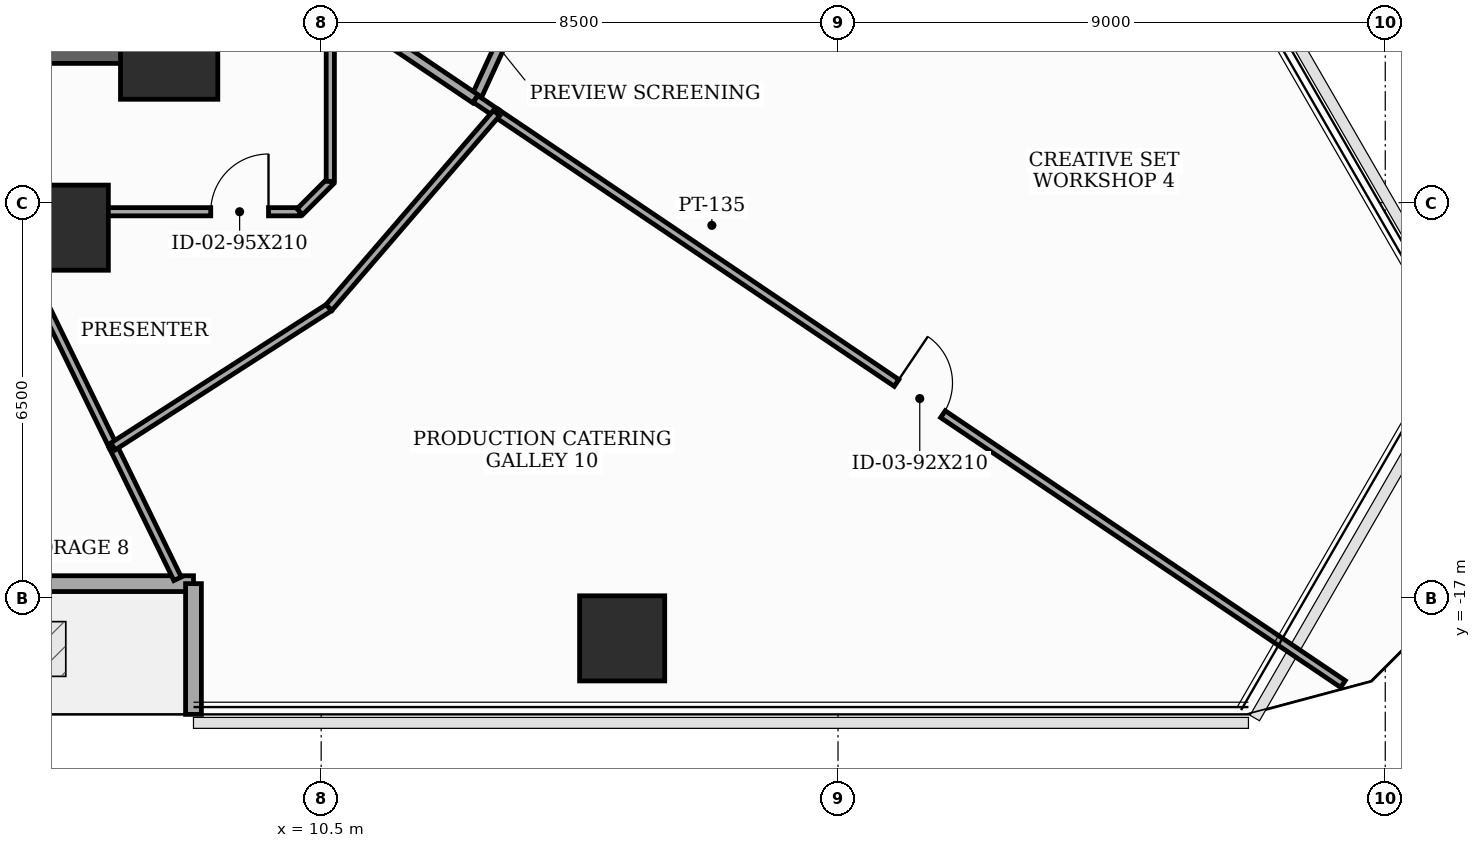
"""IFC4 building model, lengths in metres.
Left out: names, types, materials, properties, quantities, classifications, styles, units other than length and angle.
Written with IfcOpenShell. Run it as: python <this file> out.ifc"""

import sys

from ifc_helpers import new_model, si_unit, direction, frame, frame_2d, origin, origin_2d, place, context, subcontext, project, spatial, rectangle, extrude, element, fill, save


model = new_model("IFC4")
c1 = context("Model", 3, precision=1e-05, world=origin(), true_north=direction((0.0, 1.0)))
c2 = subcontext(c1, "Body", "Model", "MODEL_VIEW")
j1 = project(units=[si_unit("LENGTHUNIT", "METRE"), si_unit("PLANEANGLEUNIT", "RADIAN")], contexts=[c1])
p1 = place(None, origin())
s1 = spatial("IfcSite", under=j1, at=p1, CompositionType="ELEMENT")
p2 = place(p1, origin())
s2 = spatial("IfcBuilding", under=s1, at=p2, CompositionType="ELEMENT")
p3 = place(p2, frame((0.0, 0.0, 44.5)))
s3 = spatial("IfcBuildingStorey", under=s2, at=p3, CompositionType="ELEMENT", Elevation=44.5)
p4 = place(p3, frame((8.0, -8.0, 0.0), z_axis=(0.0, 0.0, 1.0), x_axis=(1.0, 0.0, 0.0)))
e1 = element("IfcColumn", 1, at=p4, inside=s3, PredefinedType="COLUMN", context=c2, shape_type="SweptSolid", body=[
    extrude(rectangle(XDim=1.6, YDim=1.6, at=origin_2d()), origin(), (0.0, 0.0, 1.0), 3.7),
])
for number, where, z_axis, x_axis in (
    (2, (6.3, -10.912, 0.0), (0.0, 0.0, 1.0), (1.0, 0.0, 0.0)),
    (3, (15.45, -17.667, 0.0), (0.0, 0.0, 1.0), (1.0, 0.0, 0.0)),
):
    element("IfcColumn", number, at=place(p3, frame(where, z_axis=z_axis, x_axis=x_axis)), inside=s3, PredefinedType="COLUMN", context=c2, shape_type="SweptSolid", body=[
        extrude(rectangle(XDim=1.4, YDim=1.4, at=origin_2d()), origin(), (0.0, 0.0, 1.0), 3.7),
    ])
p5 = place(p3, frame((-2.4, -16.767, 0.0), z_axis=(0.0, 0.0, 1.0), x_axis=(1.0, 0.0, 0.0)))
e4 = element("IfcWall", 4, at=p5, inside=s3, PredefinedType="SOLIDWALL", context=c2, shape_type="SweptSolid", body=[
    extrude(rectangle(XDim=10.8, YDim=0.26, at=frame_2d((5.4, 0.0))), origin(), (0.0, 0.0, 1.0), 3.5),
])
p6 = place(p5, frame((1.75, 0.0, 0.0)))
e5 = element("IfcOpeningElement", 5, at=p6, cuts=e4, PredefinedType="OPENING", context=c2, shape_type="SweptSolid", body=[
    extrude(rectangle(XDim=1.6, YDim=2.08, at=frame_2d((0.8, 1.04))), frame((0.0, 0.14, 0.0), z_axis=(0.0, -1.0, 0.0), x_axis=(1.0, 0.0, 0.0)), (0.0, 0.0, 1.0), 0.28),
])
p7 = place(p5, frame((5.65, 0.0, 0.85)))
e6 = element("IfcOpeningElement", 6, at=p7, cuts=e4, PredefinedType="OPENING", context=c2, shape_type="SweptSolid", body=[
    extrude(rectangle(XDim=1.3, YDim=1.25, at=frame_2d((0.65, 0.625))), frame((0.0, 0.14, 0.0), z_axis=(0.0, -1.0, 0.0), x_axis=(1.0, 0.0, 0.0)), (0.0, 0.0, 1.0), 0.28),
])
p8 = place(p3, frame((8.4, -16.767, 0.0), z_axis=(0.0, 0.0, 1.0), x_axis=(0.0, -1.0, 0.0)))
e7 = element("IfcWall", 7, at=p8, inside=s3, PredefinedType="SOLIDWALL", context=c2, shape_type="SweptSolid", body=[
    extrude(rectangle(XDim=2.15, YDim=0.26, at=frame_2d((1.075, 0.0))), origin(), (0.0, 0.0, 1.0), 3.5),
])
p9 = place(p3, frame((-8.0, -8.0, 0.0), z_axis=(0.0, 0.0, 1.0), x_axis=(1.0, 0.0, 0.0)))
e8 = element("IfcWall", 8, at=p9, inside=s3, PredefinedType="SHEAR", context=c2, shape_type="SweptSolid", body=[
    extrude(rectangle(XDim=16.0, YDim=0.42, at=frame_2d((8.0, 0.0))), origin(), (0.0, 0.0, 1.0), 3.5),
])
p10 = place(p9, frame((4.6, 0.0, 0.0)))
e9 = element("IfcOpeningElement", 9, at=p10, cuts=e8, PredefinedType="OPENING", context=c2, shape_type="SweptSolid", body=[
    extrude(rectangle(XDim=0.95, YDim=2.1, at=frame_2d((0.475, 1.05))), frame((0.0, 0.22, 0.0), z_axis=(0.0, -1.0, 0.0), x_axis=(1.0, 0.0, 0.0)), (0.0, 0.0, 1.0), 0.44),
])
p11 = place(p9, frame((7.52, 0.0, 0.0)))
e10 = element("IfcOpeningElement", 10, at=p11, cuts=e8, PredefinedType="OPENING", context=c2, shape_type="SweptSolid", body=[
    extrude(rectangle(XDim=0.95, YDim=2.1, at=frame_2d((0.475, 1.05))), frame((0.0, 0.22, 0.0), z_axis=(0.0, -1.0, 0.0), x_axis=(1.0, 0.0, 0.0)), (0.0, 0.0, 1.0), 0.44),
])
p12 = place(p9, frame((10.45, 0.0, 0.0)))
e11 = element("IfcOpeningElement", 11, at=p12, cuts=e8, PredefinedType="OPENING", context=c2, shape_type="SweptSolid", body=[
    extrude(rectangle(XDim=0.95, YDim=2.1, at=frame_2d((0.475, 1.05))), frame((0.0, 0.22, 0.0), z_axis=(0.0, -1.0, 0.0), x_axis=(1.0, 0.0, 0.0)), (0.0, 0.0, 1.0), 0.44),
])
p13 = place(p3, frame((5.194, -10.65, 0.0), z_axis=(0.0, 0.0, 1.0), x_axis=(1.0, 0.0, 0.0)))
e12 = element("IfcWall", 12, at=p13, inside=s3, PredefinedType="PARTITIONING", context=c2, shape_type="SweptSolid", body=[
    extrude(rectangle(XDim=4.956, YDim=0.135, at=frame_2d((2.478, 0.0))), origin(), (0.0, 0.0, 1.0), 2.785),
])
p14 = place(p13, frame((3.49, 0.0, 0.0)))
e13 = element("IfcOpeningElement", 13, at=p14, cuts=e12, PredefinedType="OPENING", context=c2, shape_type="SweptSolid", body=[
    extrude(rectangle(XDim=0.95, YDim=2.1, at=frame_2d((0.475, 1.05))), frame((0.0, 0.077, 0.0), z_axis=(0.0, -1.0, 0.0), x_axis=(1.0, 0.0, 0.0)), (0.0, 0.0, 1.0), 0.155),
])
p15 = place(p3, frame((10.15, -10.65, 0.0), z_axis=(0.0, 0.0, 1.0), x_axis=(0.707106781187, 0.707106781187, 0.0)))
e14 = element("IfcWall", 14, at=p15, inside=s3, PredefinedType="PARTITIONING", context=c2, shape_type="SweptSolid", body=[
    extrude(rectangle(XDim=0.707, YDim=0.135, at=frame_2d((0.354, 0.0))), origin(), (0.0, 0.0, 1.0), 3.5),
])
p16 = place(p3, frame((10.65, -10.15, 0.0), z_axis=(0.0, 0.0, 1.0), x_axis=(0.0, 1.0, 0.0)))
e15 = element("IfcWall", 15, at=p16, inside=s3, PredefinedType="PARTITIONING", context=c2, shape_type="SweptSolid", body=[
    extrude(rectangle(XDim=2.966, YDim=0.135, at=frame_2d((1.483, 0.0))), origin(), (0.0, 0.0, 1.0), 3.5),
])
p17 = place(p3, frame((13.038, -8.794, 0.0), z_axis=(0.0, 0.0, 1.0), x_axis=(0.417322480709, 0.908758464662, 0.0)))
e16 = element("IfcWall", 16, at=p17, inside=s3, PredefinedType="PARTITIONING", context=c2, shape_type="SweptSolid", body=[
    extrude(rectangle(XDim=4.078, YDim=0.16, at=frame_2d((2.039, 0.0))), origin(), (0.0, 0.0, 1.0), 3.5),
])
p18 = place(p3, frame((10.65, -7.184, 0.0), z_axis=(0.0, 0.0, 1.0), x_axis=(0.829196392101, -0.558957371654, 0.0)))
e17 = element("IfcWall", 17, at=p18, inside=s3, PredefinedType="PARTITIONING", context=c2, shape_type="SweptSolid", body=[
    extrude(rectangle(XDim=2.88, YDim=0.16, at=frame_2d((1.44, 0.0))), origin(), (0.0, 0.0, 1.0), 3.5),
])
p19 = place(p3, frame((13.038, -8.794, 0.0), z_axis=(0.0, 0.0, 1.0), x_axis=(0.828163729679, -0.560486250361, 0.0)))
e18 = element("IfcWall", 18, at=p19, inside=s3, PredefinedType="PARTITIONING", context=c2, shape_type="SweptSolid", body=[
    extrude(rectangle(XDim=0.418, YDim=0.135, at=frame_2d((0.209, 0.0))), origin(), (0.0, 0.0, 1.0), 3.5),
])
p20 = place(p3, frame((13.384, -9.028, 0.0), z_axis=(0.0, 0.0, 1.0), x_axis=(0.829042972493, -0.55918489765, 0.0)))
e19 = element("IfcWall", 19, at=p20, inside=s3, PredefinedType="PARTITIONING", context=c2, shape_type="SweptSolid", body=[
    extrude(rectangle(XDim=16.791, YDim=0.135, at=frame_2d((8.396, 0.0))), origin(), (0.0, 0.0, 1.0), 2.935),
])
p21 = place(p20, frame((7.936, 0.0, 0.0)))
e20 = element("IfcOpeningElement", 20, at=p21, cuts=e19, PredefinedType="OPENING", context=c2, shape_type="SweptSolid", body=[
    extrude(rectangle(XDim=0.92, YDim=2.1, at=frame_2d((0.46, 1.05))), frame((0.0, 0.077, 0.0), z_axis=(0.0, -1.0, 0.0), x_axis=(1.0, 0.0, 0.0)), (0.0, 0.0, 1.0), 0.155),
])
p22 = place(p3, frame((7.077, -14.51, 0.0), z_axis=(0.0, 0.0, 1.0), x_axis=(-0.438392272504, 0.898783742292, 0.0)))
e21 = element("IfcWall", 21, at=p22, inside=s3, PredefinedType="PARTITIONING", context=c2, shape_type="SweptSolid", body=[
    extrude(rectangle(XDim=4.295, YDim=0.135, at=frame_2d((2.147, 0.0))), origin(), (0.0, 0.0, 1.0), 2.685),
])
p23 = place(p3, frame((8.138, -16.687, 0.0), z_axis=(0.0, 0.0, 1.0), x_axis=(-0.438320348892, 0.898818820312, 0.0)))
e22 = element("IfcWall", 22, at=p23, inside=s3, PredefinedType="PARTITIONING", context=c2, shape_type="SweptSolid", body=[
    extrude(rectangle(XDim=2.422, YDim=0.135, at=frame_2d((1.211, 0.0))), origin(), (0.0, 0.0, 1.0), 3.085),
])
p24 = place(p3, frame((7.077, -14.51, 0.0), z_axis=(0.0, 0.0, 1.0), x_axis=(0.841056333741, 0.540947542258, 0.0)))
e23 = element("IfcWall", 23, at=p24, inside=s3, PredefinedType="PARTITIONING", context=c2, shape_type="SweptSolid", body=[
    extrude(rectangle(XDim=4.222, YDim=0.135, at=frame_2d((2.111, 0.0))), origin(), (0.0, 0.0, 1.0), 2.685),
])
p25 = place(p3, frame((10.628, -12.226, 0.0), z_axis=(0.0, 0.0, 1.0), x_axis=(0.652832083446, 0.757502654004, 0.0)))
e24 = element("IfcWall", 24, at=p25, inside=s3, PredefinedType="PARTITIONING", context=c2, shape_type="SweptSolid", body=[
    extrude(rectangle(XDim=4.222, YDim=0.135, at=frame_2d((2.111, 0.0))), origin(), (0.0, 0.0, 1.0), 3.5),
])
p26 = place(p14, origin())
e25 = element("IfcDoor", 25, at=p26, inside=s3, OperationType="SINGLE_SWING_RIGHT", PredefinedType="DOOR", context=c2, shape_type="SweptSolid", body=[
    extrude(rectangle(XDim=0.95, YDim=2.1, at=frame_2d((0.475, 1.05))), frame((0.0, 0.025, 0.0), z_axis=(0.0, -1.0, 0.0), x_axis=(1.0, 0.0, 0.0)), (0.0, 0.0, 1.0), 0.05),
])
fill(e13, e25)
p27 = place(p21, origin())
e26 = element("IfcDoor", 26, at=p27, inside=s3, OperationType="SINGLE_SWING_LEFT", PredefinedType="DOOR", context=c2, shape_type="SweptSolid", body=[
    extrude(rectangle(XDim=0.92, YDim=2.1, at=frame_2d((0.46, 1.05))), frame((0.0, 0.025, 0.0), z_axis=(0.0, -1.0, 0.0), x_axis=(1.0, 0.0, 0.0)), (0.0, 0.0, 1.0), 0.05),
])
fill(e20, e26)
save(model, sys.argv[1])
